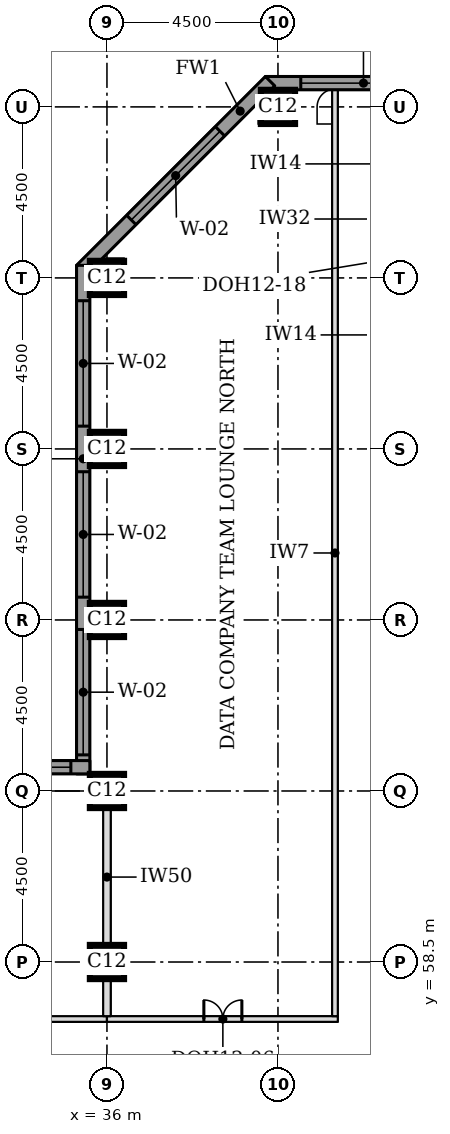
"""IFC4 building model, lengths in metres.
Left out: names, types, materials, properties, quantities, classifications, styles, units other than length and angle.
Written with IfcOpenShell. Run it as: python <this file> out.ifc"""

import sys

from ifc_helpers import new_model, si_unit, direction, frame, frame_2d, origin, origin_2d, place, context, subcontext, project, spatial, rectangle, extrude, element, fill, save


model = new_model("IFC4")
c1 = context("Model", 3, precision=1e-05, world=origin(), true_north=direction((0.0, 1.0)))
c2 = subcontext(c1, "Body", "Model", "MODEL_VIEW")
j1 = project(units=[si_unit("LENGTHUNIT", "METRE"), si_unit("PLANEANGLEUNIT", "RADIAN")], contexts=[c1])
p1 = place(None, origin())
s1 = spatial("IfcSite", under=j1, at=p1, CompositionType="ELEMENT")
p2 = place(p1, origin())
s2 = spatial("IfcBuilding", under=s1, at=p2, CompositionType="ELEMENT")
p3 = place(p2, frame((0.0, 0.0, 252.6)))
s3 = spatial("IfcBuildingStorey", under=s2, at=p3, CompositionType="ELEMENT", Elevation=252.6)
for number, where, z_axis, x_axis in (
    (1, (36.0, 58.5, 0.0), (0.0, 0.0, 1.0), (1.0, 0.0, 0.0)),
    (2, (36.0, 63.0, 0.0), (0.0, 0.0, 1.0), (1.0, 0.0, 0.0)),
    (3, (36.0, 67.5, 0.0), (0.0, 0.0, 1.0), (1.0, 0.0, 0.0)),
    (4, (36.0, 72.0, 0.0), (0.0, 0.0, 1.0), (1.0, 0.0, 0.0)),
    (5, (36.0, 76.5, 0.0), (0.0, 0.0, 1.0), (1.0, 0.0, 0.0)),
    (6, (40.5, 81.0, 0.0), (0.0, 0.0, 1.0), (1.0, 0.0, 0.0)),
):
    element("IfcColumn", number, at=place(p3, frame(where, z_axis=z_axis, x_axis=x_axis)), inside=s3, PredefinedType="COLUMN", context=c2, shape_type="SweptSolid", body=[
        extrude(rectangle(XDim=0.9, YDim=0.9, at=origin_2d()), origin(), (0.0, 0.0, 1.0), 3.7),
    ])
p4 = place(p3, frame((72.331, 81.625, 0.0), z_axis=(0.0, 0.0, 1.0), x_axis=(-1.0, 0.0, 0.0)))
e7 = element("IfcWall", 7, at=p4, inside=s3, PredefinedType="STANDARD", context=c2, shape_type="SweptSolid", body=[
    extrude(rectangle(XDim=32.163, YDim=0.35, at=frame_2d((16.081, 0.0))), origin(), (0.0, 0.0, 1.0), 3.525),
])
p5 = place(p4, frame((0.931, 0.0, 0.9)))
e8 = element("IfcOpeningElement", 8, at=p5, cuts=e7, PredefinedType="OPENING", context=c2, shape_type="SweptSolid", body=[
    extrude(rectangle(XDim=3.3, YDim=1.9, at=frame_2d((1.65, 0.95))), frame((0.0, 0.185, 0.0), z_axis=(0.0, -1.0, 0.0), x_axis=(1.0, 0.0, 0.0)), (0.0, 0.0, 1.0), 0.37),
])
p6 = place(p4, frame((5.431, 0.0, 0.9)))
e9 = element("IfcOpeningElement", 9, at=p6, cuts=e7, PredefinedType="OPENING", context=c2, shape_type="SweptSolid", body=[
    extrude(rectangle(XDim=3.3, YDim=1.9, at=frame_2d((1.65, 0.95))), frame((0.0, 0.185, 0.0), z_axis=(0.0, -1.0, 0.0), x_axis=(1.0, 0.0, 0.0)), (0.0, 0.0, 1.0), 0.37),
])
p7 = place(p4, frame((9.931, 0.0, 0.9)))
e10 = element("IfcOpeningElement", 10, at=p7, cuts=e7, PredefinedType="OPENING", context=c2, shape_type="SweptSolid", body=[
    extrude(rectangle(XDim=3.3, YDim=1.9, at=frame_2d((1.65, 0.95))), frame((0.0, 0.185, 0.0), z_axis=(0.0, -1.0, 0.0), x_axis=(1.0, 0.0, 0.0)), (0.0, 0.0, 1.0), 0.37),
])
p8 = place(p4, frame((14.431, 0.0, 0.9)))
e11 = element("IfcOpeningElement", 11, at=p8, cuts=e7, PredefinedType="OPENING", context=c2, shape_type="SweptSolid", body=[
    extrude(rectangle(XDim=3.3, YDim=1.9, at=frame_2d((1.65, 0.95))), frame((0.0, 0.185, 0.0), z_axis=(0.0, -1.0, 0.0), x_axis=(1.0, 0.0, 0.0)), (0.0, 0.0, 1.0), 0.37),
])
p9 = place(p4, frame((18.931, 0.0, 0.9)))
e12 = element("IfcOpeningElement", 12, at=p9, cuts=e7, PredefinedType="OPENING", context=c2, shape_type="SweptSolid", body=[
    extrude(rectangle(XDim=3.3, YDim=1.9, at=frame_2d((1.65, 0.95))), frame((0.0, 0.185, 0.0), z_axis=(0.0, -1.0, 0.0), x_axis=(1.0, 0.0, 0.0)), (0.0, 0.0, 1.0), 0.37),
])
p10 = place(p4, frame((23.431, 0.0, 0.9)))
e13 = element("IfcOpeningElement", 13, at=p10, cuts=e7, PredefinedType="OPENING", context=c2, shape_type="SweptSolid", body=[
    extrude(rectangle(XDim=3.3, YDim=1.9, at=frame_2d((1.65, 0.95))), frame((0.0, 0.185, 0.0), z_axis=(0.0, -1.0, 0.0), x_axis=(1.0, 0.0, 0.0)), (0.0, 0.0, 1.0), 0.37),
])
p11 = place(p4, frame((27.931, 0.0, 0.9)))
e14 = element("IfcOpeningElement", 14, at=p11, cuts=e7, PredefinedType="OPENING", context=c2, shape_type="SweptSolid", body=[
    extrude(rectangle(XDim=3.3, YDim=1.9, at=frame_2d((1.65, 0.95))), frame((0.0, 0.185, 0.0), z_axis=(0.0, -1.0, 0.0), x_axis=(1.0, 0.0, 0.0)), (0.0, 0.0, 1.0), 0.37),
])
p12 = place(p3, frame((40.292, 81.676, 0.0), z_axis=(0.0, 0.0, 1.0), x_axis=(-0.707106781187, -0.707106781187, 0.0)))
e15 = element("IfcWall", 15, at=p12, inside=s3, PredefinedType="STANDARD", context=c2, shape_type="SweptSolid", body=[
    extrude(rectangle(XDim=7.027, YDim=0.35, at=frame_2d((3.513, 0.0))), origin(), (0.0, 0.0, 1.0), 3.525),
])
p13 = place(p12, frame((1.863, 0.0, 0.9)))
e16 = element("IfcOpeningElement", 16, at=p13, cuts=e15, PredefinedType="OPENING", context=c2, shape_type="SweptSolid", body=[
    extrude(rectangle(XDim=3.3, YDim=1.9, at=frame_2d((1.65, 0.95))), frame((0.0, 0.185, 0.0), z_axis=(0.0, -1.0, 0.0), x_axis=(1.0, 0.0, 0.0)), (0.0, 0.0, 1.0), 0.37),
])
p14 = place(p3, frame((35.375, 76.831, 0.0), z_axis=(0.0, 0.0, 1.0), x_axis=(0.0, -1.0, 0.0)))
e17 = element("IfcWall", 17, at=p14, inside=s3, PredefinedType="STANDARD", context=c2, shape_type="SweptSolid", body=[
    extrude(rectangle(XDim=13.381, YDim=0.35, at=frame_2d((6.691, 0.0))), origin(), (0.0, 0.0, 1.0), 3.525),
])
p15 = place(p14, frame((0.931, 0.0, 0.9)))
e18 = element("IfcOpeningElement", 18, at=p15, cuts=e17, PredefinedType="OPENING", context=c2, shape_type="SweptSolid", body=[
    extrude(rectangle(XDim=3.3, YDim=1.9, at=frame_2d((1.65, 0.95))), frame((0.0, 0.185, 0.0), z_axis=(0.0, -1.0, 0.0), x_axis=(1.0, 0.0, 0.0)), (0.0, 0.0, 1.0), 0.37),
])
p16 = place(p14, frame((5.431, 0.0, 0.9)))
e19 = element("IfcOpeningElement", 19, at=p16, cuts=e17, PredefinedType="OPENING", context=c2, shape_type="SweptSolid", body=[
    extrude(rectangle(XDim=3.3, YDim=1.9, at=frame_2d((1.65, 0.95))), frame((0.0, 0.185, 0.0), z_axis=(0.0, -1.0, 0.0), x_axis=(1.0, 0.0, 0.0)), (0.0, 0.0, 1.0), 0.37),
])
p17 = place(p14, frame((9.581, 0.0, 0.9)))
e20 = element("IfcOpeningElement", 20, at=p17, cuts=e17, PredefinedType="OPENING", context=c2, shape_type="SweptSolid", body=[
    extrude(rectangle(XDim=3.3, YDim=1.9, at=frame_2d((1.65, 0.95))), frame((0.0, 0.185, 0.0), z_axis=(0.0, -1.0, 0.0), x_axis=(1.0, 0.0, 0.0)), (0.0, 0.0, 1.0), 0.37),
])
p18 = place(p3, frame((35.55, 63.625, 0.0), z_axis=(0.0, 0.0, 1.0), x_axis=(-1.0, 0.0, 0.0)))
e21 = element("IfcWall", 21, at=p18, inside=s3, PredefinedType="STANDARD", context=c2, shape_type="SweptSolid", body=[
    extrude(rectangle(XDim=17.881, YDim=0.35, at=frame_2d((8.941, 0.0))), origin(), (0.0, 0.0, 1.0), 3.525),
])
p19 = place(p18, frame((0.5, 0.0, 0.9)))
e22 = element("IfcOpeningElement", 22, at=p19, cuts=e21, PredefinedType="OPENING", context=c2, shape_type="SweptSolid", body=[
    extrude(rectangle(XDim=3.3, YDim=1.9, at=frame_2d((1.65, 0.95))), frame((0.0, 0.185, 0.0), z_axis=(0.0, -1.0, 0.0), x_axis=(1.0, 0.0, 0.0)), (0.0, 0.0, 1.0), 0.37),
])
p20 = place(p18, frame((4.65, 0.0, 0.9)))
e23 = element("IfcOpeningElement", 23, at=p20, cuts=e21, PredefinedType="OPENING", context=c2, shape_type="SweptSolid", body=[
    extrude(rectangle(XDim=3.3, YDim=1.9, at=frame_2d((1.65, 0.95))), frame((0.0, 0.185, 0.0), z_axis=(0.0, -1.0, 0.0), x_axis=(1.0, 0.0, 0.0)), (0.0, 0.0, 1.0), 0.37),
])
p21 = place(p18, frame((9.15, 0.0, 0.9)))
e24 = element("IfcOpeningElement", 24, at=p21, cuts=e21, PredefinedType="OPENING", context=c2, shape_type="SweptSolid", body=[
    extrude(rectangle(XDim=3.3, YDim=1.9, at=frame_2d((1.65, 0.95))), frame((0.0, 0.185, 0.0), z_axis=(0.0, -1.0, 0.0), x_axis=(1.0, 0.0, 0.0)), (0.0, 0.0, 1.0), 0.37),
])
p22 = place(p18, frame((13.65, 0.0, 0.9)))
e25 = element("IfcOpeningElement", 25, at=p22, cuts=e21, PredefinedType="OPENING", context=c2, shape_type="SweptSolid", body=[
    extrude(rectangle(XDim=3.3, YDim=1.9, at=frame_2d((1.65, 0.95))), frame((0.0, 0.185, 0.0), z_axis=(0.0, -1.0, 0.0), x_axis=(1.0, 0.0, 0.0)), (0.0, 0.0, 1.0), 0.37),
])
p23 = place(p3, frame((29.38, 57.0, 0.0), z_axis=(0.0, 0.0, 1.0), x_axis=(1.0, 0.0, 0.0)))
e26 = element("IfcWall", 26, at=p23, inside=s3, PredefinedType="PARTITIONING", context=c2, shape_type="SweptSolid", body=[
    extrude(rectangle(XDim=6.62, YDim=0.15, at=frame_2d((3.31, 0.0))), origin(), (0.0, 0.0, 1.0), 3.55),
])
p24 = place(p23, frame((2.88, 0.0, 0.0)))
e27 = element("IfcOpeningElement", 27, at=p24, cuts=e26, PredefinedType="OPENING", context=c2, shape_type="SweptSolid", body=[
    extrude(rectangle(XDim=1.0, YDim=2.1, at=frame_2d((0.5, 1.05))), frame((0.0, 0.085, 0.0), z_axis=(0.0, -1.0, 0.0), x_axis=(1.0, 0.0, 0.0)), (0.0, 0.0, 1.0), 0.17),
])
p25 = place(p3, frame((36.0, 57.0, 0.0), z_axis=(0.0, 0.0, 1.0), x_axis=(1.0, 0.0, 0.0)))
e28 = element("IfcWall", 28, at=p25, inside=s3, PredefinedType="PARTITIONING", context=c2, shape_type="SweptSolid", body=[
    extrude(rectangle(XDim=6.075, YDim=0.15, at=frame_2d((3.038, 0.0))), origin(), (0.0, 0.0, 1.0), 3.55),
])
p26 = place(p25, frame((2.55, 0.0, 0.0)))
e29 = element("IfcOpeningElement", 29, at=p26, cuts=e28, PredefinedType="OPENING", context=c2, shape_type="SweptSolid", body=[
    extrude(rectangle(XDim=1.0, YDim=2.1, at=frame_2d((0.5, 1.05))), frame((0.0, 0.085, 0.0), z_axis=(0.0, -1.0, 0.0), x_axis=(1.0, 0.0, 0.0)), (0.0, 0.0, 1.0), 0.17),
])
p27 = place(p3, frame((36.0, 57.075, 0.0), z_axis=(0.0, 0.0, 1.0), x_axis=(0.0, 1.0, 0.0)))
e30 = element("IfcWall", 30, at=p27, inside=s3, PredefinedType="PARTITIONING", context=c2, shape_type="SweptSolid", body=[
    extrude(rectangle(XDim=0.975, YDim=0.2, at=frame_2d((0.488, 0.0))), origin(), (0.0, 0.0, 1.0), 2.8),
])
p28 = place(p3, frame((42.0, 57.075, 0.0), z_axis=(0.0, 0.0, 1.0), x_axis=(0.0, 1.0, 0.0)))
e31 = element("IfcWall", 31, at=p28, inside=s3, PredefinedType="PARTITIONING", context=c2, shape_type="SweptSolid", body=[
    extrude(rectangle(XDim=24.375, YDim=0.15, at=frame_2d((12.188, 0.0))), origin(), (0.0, 0.0, 1.0), 3.55),
])
p29 = place(p3, frame((36.0, 58.92, 0.0), z_axis=(0.0, 0.0, 1.0), x_axis=(0.0, 1.0, 0.0)))
e32 = element("IfcWall", 32, at=p29, inside=s3, PredefinedType="PARTITIONING", context=c2, shape_type="SweptSolid", body=[
    extrude(rectangle(XDim=3.63, YDim=0.2, at=frame_2d((1.815, 0.0))), origin(), (0.0, 0.0, 1.0), 2.8),
])
p30 = place(p11, origin())
e33 = element("IfcWindow", 33, at=p30, inside=s3, PartitioningType="SINGLE_PANEL", PredefinedType="WINDOW", context=c2, shape_type="SweptSolid", body=[
    extrude(rectangle(XDim=3.3, YDim=1.9, at=frame_2d((1.65, 0.95))), frame((0.0, 0.085, 0.0), z_axis=(0.0, -1.0, 0.0), x_axis=(1.0, 0.0, 0.0)), (0.0, 0.0, 1.0), 0.06),
])
fill(e14, e33)
p31 = place(p13, origin())
e34 = element("IfcWindow", 34, at=p31, inside=s3, PartitioningType="SINGLE_PANEL", PredefinedType="WINDOW", context=c2, shape_type="SweptSolid", body=[
    extrude(rectangle(XDim=3.3, YDim=1.9, at=frame_2d((1.65, 0.95))), frame((0.0, 0.085, 0.0), z_axis=(0.0, -1.0, 0.0), x_axis=(1.0, 0.0, 0.0)), (0.0, 0.0, 1.0), 0.06),
])
fill(e16, e34)
p32 = place(p15, origin())
e35 = element("IfcWindow", 35, at=p32, inside=s3, PartitioningType="SINGLE_PANEL", PredefinedType="WINDOW", context=c2, shape_type="SweptSolid", body=[
    extrude(rectangle(XDim=3.3, YDim=1.9, at=frame_2d((1.65, 0.95))), frame((0.0, 0.085, 0.0), z_axis=(0.0, -1.0, 0.0), x_axis=(1.0, 0.0, 0.0)), (0.0, 0.0, 1.0), 0.06),
])
fill(e18, e35)
p33 = place(p16, origin())
e36 = element("IfcWindow", 36, at=p33, inside=s3, PartitioningType="SINGLE_PANEL", PredefinedType="WINDOW", context=c2, shape_type="SweptSolid", body=[
    extrude(rectangle(XDim=3.3, YDim=1.9, at=frame_2d((1.65, 0.95))), frame((0.0, 0.085, 0.0), z_axis=(0.0, -1.0, 0.0), x_axis=(1.0, 0.0, 0.0)), (0.0, 0.0, 1.0), 0.06),
])
fill(e19, e36)
p34 = place(p17, origin())
e37 = element("IfcWindow", 37, at=p34, inside=s3, PartitioningType="SINGLE_PANEL", PredefinedType="WINDOW", context=c2, shape_type="SweptSolid", body=[
    extrude(rectangle(XDim=3.3, YDim=1.9, at=frame_2d((1.65, 0.95))), frame((0.0, 0.085, 0.0), z_axis=(0.0, -1.0, 0.0), x_axis=(1.0, 0.0, 0.0)), (0.0, 0.0, 1.0), 0.06),
])
fill(e20, e37)
p35 = place(p19, origin())
e38 = element("IfcWindow", 38, at=p35, inside=s3, PartitioningType="SINGLE_PANEL", PredefinedType="WINDOW", context=c2, shape_type="SweptSolid", body=[
    extrude(rectangle(XDim=3.3, YDim=1.9, at=frame_2d((1.65, 0.95))), frame((0.0, 0.085, 0.0), z_axis=(0.0, -1.0, 0.0), x_axis=(1.0, 0.0, 0.0)), (0.0, 0.0, 1.0), 0.06),
])
fill(e22, e38)
p36 = place(p26, origin())
e39 = element("IfcDoor", 39, at=p36, inside=s3, OperationType="DOUBLE_DOOR_SINGLE_SWING", PredefinedType="DOOR", context=c2, shape_type="SweptSolid", body=[
    extrude(rectangle(XDim=1.0, YDim=2.1, at=frame_2d((0.5, 1.05))), frame((0.0, 0.025, 0.0), z_axis=(0.0, -1.0, 0.0), x_axis=(1.0, 0.0, 0.0)), (0.0, 0.0, 1.0), 0.05),
])
fill(e29, e39)
save(model, sys.argv[1])
